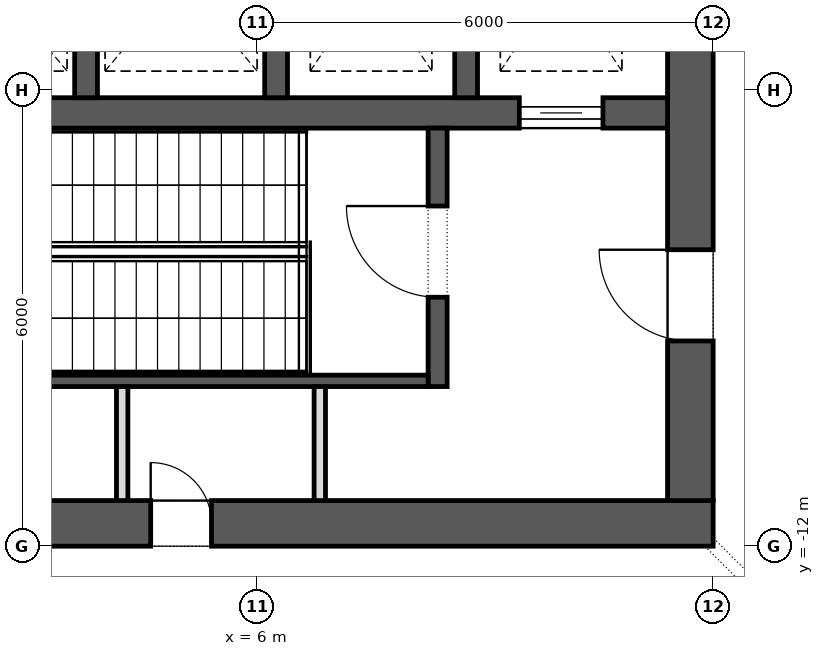
"""IFC4 building model, lengths in metres.
Left out: names, types, materials, properties, quantities, classifications, styles, units other than length and angle.
Written with IfcOpenShell. Run it as: python <this file> out.ifc"""

import sys

from ifc_helpers import new_model, si_unit, direction, frame, frame_2d, origin, place, context, subcontext, project, spatial, rectangle, extrude, element, fill, save


model = new_model("IFC4")
c1 = context("Model", 3, precision=1e-05, world=origin(), true_north=direction((0.0, 1.0)))
c2 = subcontext(c1, "Body", "Model", "MODEL_VIEW")
j1 = project(units=[si_unit("LENGTHUNIT", "METRE"), si_unit("PLANEANGLEUNIT", "RADIAN")], contexts=[c1])
p1 = place(None, origin())
s1 = spatial("IfcSite", under=j1, at=p1, CompositionType="ELEMENT")
p2 = place(p1, origin())
s2 = spatial("IfcBuilding", under=s1, at=p2, CompositionType="ELEMENT")
p3 = place(p2, frame((0.0, 0.0, 12.5)))
s3 = spatial("IfcBuildingStorey", under=s2, at=p3, CompositionType="ELEMENT", Elevation=12.5)
p4 = place(p3, frame((-12.0, -11.7, 0.0), z_axis=(0.0, 0.0, 1.0), x_axis=(1.0, 0.0, 0.0)))
e1 = element("IfcWall", 1, at=p4, inside=s3, PredefinedType="SHEAR", context=c2, shape_type="SweptSolid", body=[
    extrude(rectangle(XDim=24.0, YDim=0.6, at=frame_2d((12.0, 0.0))), origin(), (0.0, 0.0, 1.0), 5.5),
])
p5 = place(p4, frame((9.275, 0.0, 0.0)))
e2 = element("IfcOpeningElement", 2, at=p5, cuts=e1, PredefinedType="OPENING", context=c2, shape_type="SweptSolid", body=[
    extrude(rectangle(XDim=0.9, YDim=2.1, at=frame_2d((0.45, 1.05))), frame((0.0, 0.312, 0.0), z_axis=(0.0, -1.0, 0.0), x_axis=(1.0, 0.0, 0.0)), (0.0, 0.0, 1.0), 0.624),
])
p6 = place(p4, frame((10.925, 0.0, 0.0)))
e3 = element("IfcOpeningElement", 3, at=p6, cuts=e1, PredefinedType="OPENING", context=c2, shape_type="SweptSolid", body=[
    extrude(rectangle(XDim=0.9, YDim=2.1, at=frame_2d((0.45, 1.05))), frame((0.0, 0.312, 0.0), z_axis=(0.0, -1.0, 0.0), x_axis=(1.0, 0.0, 0.0)), (0.0, 0.0, 1.0), 0.624),
])
p7 = place(p4, frame((4.2, 0.0, 0.0)))
e4 = element("IfcOpeningElement", 4, at=p7, cuts=e1, PredefinedType="OPENING", context=c2, shape_type="SweptSolid", body=[
    extrude(rectangle(XDim=0.8, YDim=2.1, at=frame_2d((0.4, 1.05))), frame((0.0, 0.312, 0.0), z_axis=(0.0, -1.0, 0.0), x_axis=(1.0, 0.0, 0.0)), (0.0, 0.0, 1.0), 0.624),
])
p8 = place(p4, frame((6.8, 0.0, 0.0)))
e5 = element("IfcOpeningElement", 5, at=p8, cuts=e1, PredefinedType="OPENING", context=c2, shape_type="SweptSolid", body=[
    extrude(rectangle(XDim=0.8, YDim=2.1, at=frame_2d((0.4, 1.05))), frame((0.0, 0.312, 0.0), z_axis=(0.0, -1.0, 0.0), x_axis=(1.0, 0.0, 0.0)), (0.0, 0.0, 1.0), 0.624),
])
p9 = place(p4, frame((13.8, 0.0, 0.0)))
e6 = element("IfcOpeningElement", 6, at=p9, cuts=e1, PredefinedType="OPENING", context=c2, shape_type="SweptSolid", body=[
    extrude(rectangle(XDim=0.8, YDim=2.1, at=frame_2d((0.4, 1.05))), frame((0.0, 0.312, 0.0), z_axis=(0.0, -1.0, 0.0), x_axis=(1.0, 0.0, 0.0)), (0.0, 0.0, 1.0), 0.624),
])
p10 = place(p4, frame((16.6, 0.0, 0.0)))
e7 = element("IfcOpeningElement", 7, at=p10, cuts=e1, PredefinedType="OPENING", context=c2, shape_type="SweptSolid", body=[
    extrude(rectangle(XDim=0.8, YDim=2.1, at=frame_2d((0.4, 1.05))), frame((0.0, 0.312, 0.0), z_axis=(0.0, -1.0, 0.0), x_axis=(1.0, 0.0, 0.0)), (0.0, 0.0, 1.0), 0.624),
])
p11 = place(p3, frame((11.7, -11.4, 0.0), z_axis=(0.0, 0.0, 1.0), x_axis=(0.0, 1.0, 0.0)))
e8 = element("IfcWall", 8, at=p11, inside=s3, PredefinedType="SHEAR", context=c2, shape_type="SweptSolid", body=[
    extrude(rectangle(XDim=22.8, YDim=0.6, at=frame_2d((11.4, 0.0))), origin(), (0.0, 0.0, 1.0), 5.5),
])
p12 = place(p11, frame((10.2, 0.0, 0.0)))
e9 = element("IfcOpeningElement", 9, at=p12, cuts=e8, PredefinedType="OPENING", context=c2, shape_type="SweptSolid", body=[
    extrude(rectangle(XDim=2.4, YDim=2.1, at=frame_2d((1.2, 1.05))), frame((0.0, 0.312, 0.0), z_axis=(0.0, -1.0, 0.0), x_axis=(1.0, 0.0, 0.0)), (0.0, 0.0, 1.0), 0.624),
])
p13 = place(p11, frame((19.5, 0.0, 0.0)))
e10 = element("IfcOpeningElement", 10, at=p13, cuts=e8, PredefinedType="OPENING", context=c2, shape_type="SweptSolid", body=[
    extrude(rectangle(XDim=1.2, YDim=2.1, at=frame_2d((0.6, 1.05))), frame((0.0, 0.312, 0.0), z_axis=(0.0, -1.0, 0.0), x_axis=(1.0, 0.0, 0.0)), (0.0, 0.0, 1.0), 0.624),
])
p14 = place(p11, frame((2.1, 0.0, 0.0)))
e11 = element("IfcOpeningElement", 11, at=p14, cuts=e8, PredefinedType="OPENING", context=c2, shape_type="SweptSolid", body=[
    extrude(rectangle(XDim=1.2, YDim=2.1, at=frame_2d((0.6, 1.05))), frame((0.0, 0.312, 0.0), z_axis=(0.0, -1.0, 0.0), x_axis=(1.0, 0.0, 0.0)), (0.0, 0.0, 1.0), 0.624),
])
p15 = place(p3, frame((-11.4, -6.3, 0.0), z_axis=(0.0, 0.0, 1.0), x_axis=(1.0, 0.0, 0.0)))
e12 = element("IfcWall", 12, at=p15, inside=s3, PredefinedType="SHEAR", context=c2, shape_type="SweptSolid", body=[
    extrude(rectangle(XDim=22.8, YDim=0.4, at=frame_2d((11.4, 0.0))), origin(), (0.0, 0.0, 1.0), 5.5),
])
p16 = place(p15, frame((20.85, 0.0, 0.0)))
e13 = element("IfcOpeningElement", 13, at=p16, cuts=e12, PredefinedType="OPENING", context=c2, shape_type="SweptSolid", body=[
    extrude(rectangle(XDim=1.1, YDim=2.1, at=frame_2d((0.55, 1.05))), frame((0.0, 0.212, 0.0), z_axis=(0.0, -1.0, 0.0), x_axis=(1.0, 0.0, 0.0)), (0.0, 0.0, 1.0), 0.424),
])
for number, where, z_axis, x_axis in (
    (14, (3.75, -6.1, 0.0), (0.0, 0.0, 1.0), (0.0, 1.0, 0.0)),
    (15, (6.25, -6.1, 0.0), (0.0, 0.0, 1.0), (0.0, 1.0, 0.0)),
    (16, (8.75, -6.1, 0.0), (0.0, 0.0, 1.0), (0.0, 1.0, 0.0)),
):
    element("IfcWall", number, at=place(p3, frame(where, z_axis=z_axis, x_axis=x_axis)), inside=s3, PredefinedType="SHEAR", context=c2, shape_type="SweptSolid", body=[
        extrude(rectangle(XDim=2.9, YDim=0.3, at=frame_2d((1.45, 0.0))), origin(), (0.0, 0.0, 1.0), 5.5),
    ])
p17 = place(p3, frame((8.375, -9.9, 0.0), z_axis=(0.0, 0.0, 1.0), x_axis=(0.0, 1.0, 0.0)))
e17 = element("IfcWall", 17, at=p17, inside=s3, PredefinedType="SHEAR", context=c2, shape_type="SweptSolid", body=[
    extrude(rectangle(XDim=3.4, YDim=0.25, at=frame_2d((1.7, 0.0))), origin(), (0.0, 0.0, 1.0), 5.15),
])
p18 = place(p17, frame((1.175, 0.0, 0.0)))
e18 = element("IfcOpeningElement", 18, at=p18, cuts=e17, PredefinedType="OPENING", context=c2, shape_type="SweptSolid", body=[
    extrude(rectangle(XDim=1.2, YDim=2.1, at=frame_2d((0.6, 1.05))), frame((0.0, 0.137, 0.0), z_axis=(0.0, -1.0, 0.0), x_axis=(1.0, 0.0, 0.0)), (0.0, 0.0, 1.0), 0.274),
])
p19 = place(p3, frame((0.25, -9.825, 0.0), z_axis=(0.0, 0.0, 1.0), x_axis=(1.0, 0.0, 0.0)))
e19 = element("IfcWall", 19, at=p19, inside=s3, PredefinedType="SHEAR", context=c2, shape_type="SweptSolid", body=[
    extrude(rectangle(XDim=8.0, YDim=0.15, at=frame_2d((4.0, 0.0))), origin(), (0.0, 0.0, 1.0), 5.15),
])
for number, where, z_axis, x_axis in (
    (20, (4.225, -11.4, 0.0), (0.0, 0.0, 1.0), (0.0, 1.0, 0.0)),
    (21, (6.825, -11.4, 0.0), (0.0, 0.0, 1.0), (0.0, 1.0, 0.0)),
):
    element("IfcWall", number, at=place(p3, frame(where, z_axis=z_axis, x_axis=x_axis)), inside=s3, PredefinedType="PARTITIONING", context=c2, shape_type="SweptSolid", body=[
        extrude(rectangle(XDim=1.5, YDim=0.15, at=frame_2d((0.75, 0.0))), origin(), (0.0, 0.0, 1.0), 5.15),
    ])
p20 = place(p16, origin())
e22 = element("IfcDoor", 22, at=p20, inside=s3, OperationType="SLIDING_TO_LEFT", PredefinedType="DOOR", context=c2, shape_type="SweptSolid", body=[
    extrude(rectangle(XDim=1.1, YDim=2.1, at=frame_2d((0.55, 1.05))), frame((0.0, 0.025, 0.0), z_axis=(0.0, -1.0, 0.0), x_axis=(1.0, 0.0, 0.0)), (0.0, 0.0, 1.0), 0.05),
])
fill(e13, e22)
p21 = place(p18, origin())
e23 = element("IfcDoor", 23, at=p21, inside=s3, OperationType="SINGLE_SWING_LEFT", PredefinedType="DOOR", context=c2, shape_type="SweptSolid", body=[
    extrude(rectangle(XDim=1.2, YDim=2.1, at=frame_2d((0.6, 1.05))), frame((0.0, 0.025, 0.0), z_axis=(0.0, -1.0, 0.0), x_axis=(1.0, 0.0, 0.0)), (0.0, 0.0, 1.0), 0.05),
])
fill(e18, e23)
p22 = place(p14, origin())
e24 = element("IfcDoor", 24, at=p22, inside=s3, OperationType="SINGLE_SWING_LEFT", PredefinedType="DOOR", context=c2, shape_type="SweptSolid", body=[
    extrude(rectangle(XDim=1.2, YDim=2.1, at=frame_2d((0.6, 1.05))), frame((0.0, 0.025, 0.0), z_axis=(0.0, -1.0, 0.0), x_axis=(1.0, 0.0, 0.0)), (0.0, 0.0, 1.0), 0.05),
])
fill(e11, e24)
p23 = place(p10, origin())
e25 = element("IfcDoor", 25, at=p23, inside=s3, OperationType="SINGLE_SWING_RIGHT", PredefinedType="DOOR", context=c2, shape_type="SweptSolid", body=[
    extrude(rectangle(XDim=0.8, YDim=2.1, at=frame_2d((0.4, 1.05))), frame((0.0, 0.025, 0.0), z_axis=(0.0, -1.0, 0.0), x_axis=(1.0, 0.0, 0.0)), (0.0, 0.0, 1.0), 0.05),
])
fill(e7, e25)
save(model, sys.argv[1])
